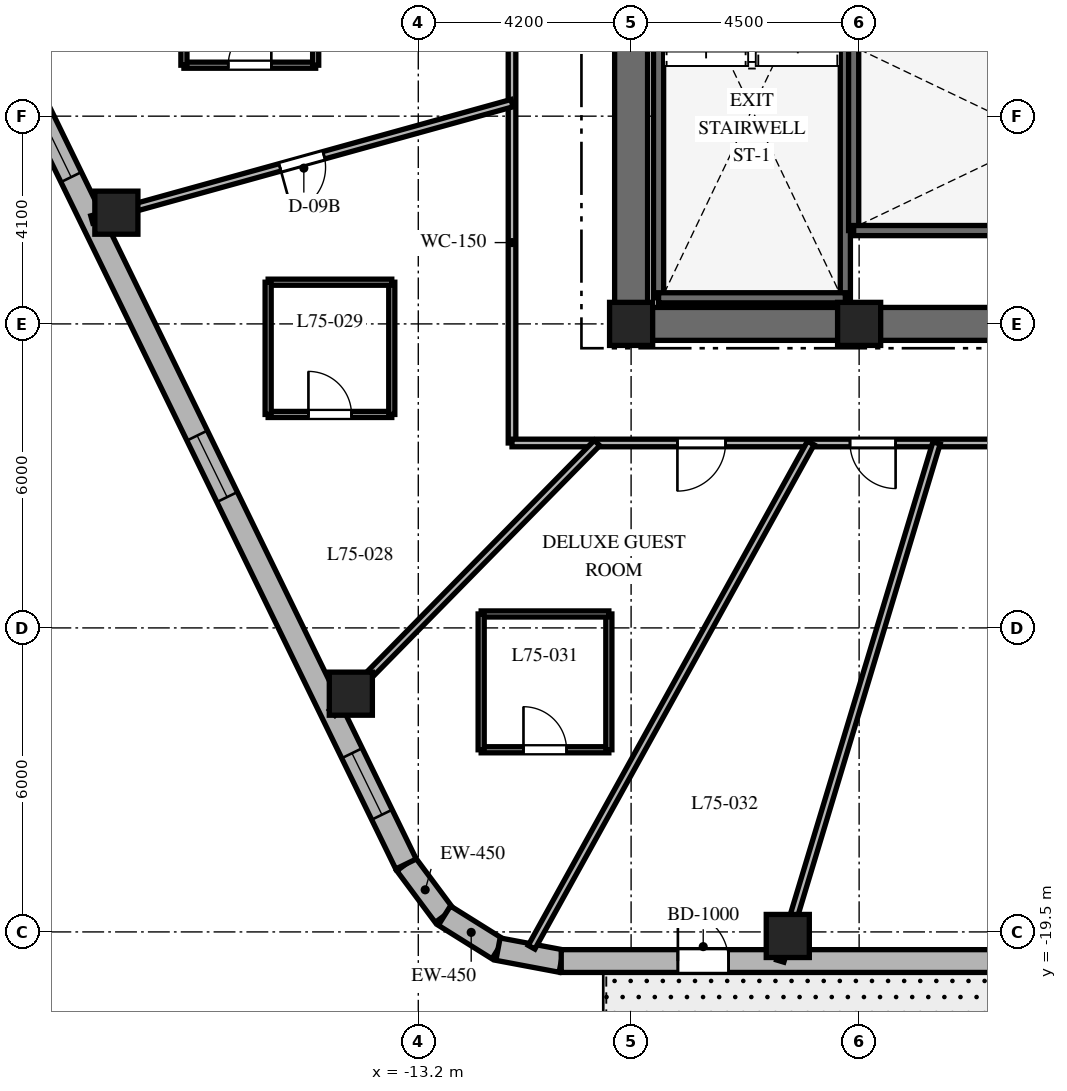
"""IFC4 building model, lengths in metres.
Left out: names, types, materials, properties, quantities, classifications, styles, units other than length and angle.
Written with IfcOpenShell. Run it as: python <this file> out.ifc"""

import sys

from ifc_helpers import new_model, si_unit, direction, frame, frame_2d, origin, origin_2d, place, context, subcontext, project, spatial, rectangle, extrude, element, fill, save


model = new_model("IFC4")
c1 = context("Model", 3, precision=1e-05, world=origin(), true_north=direction((0.0, 1.0)))
c2 = subcontext(c1, "Body", "Model", "MODEL_VIEW")
j1 = project(units=[si_unit("LENGTHUNIT", "METRE"), si_unit("PLANEANGLEUNIT", "RADIAN")], contexts=[c1])
p1 = place(None, origin())
s1 = spatial("IfcSite", under=j1, at=p1, CompositionType="ELEMENT")
p2 = place(p1, origin())
s2 = spatial("IfcBuilding", under=s1, at=p2, CompositionType="ELEMENT")
p3 = place(p2, frame((0.0, 0.0, 301.5)))
s3 = spatial("IfcBuildingStorey", under=s2, at=p3, CompositionType="ELEMENT", Elevation=301.5)
p4 = place(p3, frame((-9.325, -7.5, 0.0), z_axis=(0.0, 0.0, 1.0), x_axis=(1.0, 0.0, 0.0)))
e1 = element("IfcWall", 1, at=p4, inside=s3, PredefinedType="SHEAR", context=c2, shape_type="SweptSolid", body=[
    extrude(rectangle(XDim=18.65, YDim=0.65, at=frame_2d((9.325, 0.0))), origin(), (0.0, 0.0, 1.0), 3.9),
])
p5 = place(p4, frame((9.375, 0.0, 0.0)))
e2 = element("IfcOpeningElement", 2, at=p5, cuts=e1, PredefinedType="OPENING", context=c2, shape_type="SweptSolid", body=[
    extrude(rectangle(XDim=1.0, YDim=2.15, at=frame_2d((0.5, 1.075))), frame((0.0, 0.335, 0.0), z_axis=(0.0, -1.0, 0.0), x_axis=(1.0, 0.0, 0.0)), (0.0, 0.0, 1.0), 0.67),
])
p6 = place(p3, frame((-9.0, -7.175, 0.0), z_axis=(0.0, 0.0, 1.0), x_axis=(0.0, 1.0, 0.0)))
e3 = element("IfcWall", 3, at=p6, inside=s3, PredefinedType="SHEAR", context=c2, shape_type="SweptSolid", body=[
    extrude(rectangle(XDim=14.35, YDim=0.65, at=frame_2d((7.175, 0.0))), origin(), (0.0, 0.0, 1.0), 3.9),
])
p7 = place(p6, frame((10.3, 0.0, 0.0)))
e4 = element("IfcOpeningElement", 4, at=p7, cuts=e3, PredefinedType="OPENING", context=c2, shape_type="SweptSolid", body=[
    extrude(rectangle(XDim=1.05, YDim=2.15, at=frame_2d((0.525, 1.075))), frame((0.0, 0.335, 0.0), z_axis=(0.0, -1.0, 0.0), x_axis=(1.0, 0.0, 0.0)), (0.0, 0.0, 1.0), 0.67),
])
for number, where, z_axis, x_axis in (
    (5, (-8.458, -6.985, 0.0), (0.0, 0.0, 1.0), (0.0, 1.0, 0.0)),
    (6, (-4.772, -6.985, 0.0), (0.0, 0.0, 1.0), (0.0, 1.0, 0.0)),
):
    element("IfcWall", number, at=place(p3, frame(where, z_axis=z_axis, x_axis=x_axis)), inside=s3, PredefinedType="SHEAR", context=c2, shape_type="SweptSolid", body=[
        extrude(rectangle(XDim=9.143, YDim=0.2, at=frame_2d((4.572, 0.0))), origin(), (0.0, 0.0, 1.0), 3.9),
    ])
for number, where, z_axis, x_axis in (
    (7, (-8.458, -6.985, 0.0), (0.0, 0.0, 1.0), (1.0, 0.0, 0.0)),
    (8, (-4.608, -5.658, 0.0), (0.0, 0.0, 1.0), (0.0, 1.0, 0.0)),
):
    element("IfcWall", number, at=place(p3, frame(where, z_axis=z_axis, x_axis=x_axis)), inside=s3, PredefinedType="SHEAR", context=c2, shape_type="SweptSolid", body=[
        extrude(rectangle(XDim=3.686, YDim=0.2, at=frame_2d((1.843, 0.0))), origin(), (0.0, 0.0, 1.0), 3.9),
    ])
p8 = place(p3, frame((-4.608, -5.658, 0.0), z_axis=(0.0, 0.0, 1.0), x_axis=(1.0, 0.0, 0.0)))
e9 = element("IfcWall", 9, at=p8, inside=s3, PredefinedType="SHEAR", context=c2, shape_type="SweptSolid", body=[
    extrude(rectangle(XDim=9.166, YDim=0.2, at=frame_2d((4.583, 0.0))), origin(), (0.0, 0.0, 1.0), 3.9),
])
p9 = place(p8, frame((7.45, 0.0, 0.0)))
e10 = element("IfcOpeningElement", 10, at=p9, cuts=e9, PredefinedType="OPENING", context=c2, shape_type="SweptSolid", body=[
    extrude(rectangle(XDim=1.0, YDim=2.15, at=frame_2d((0.5, 1.075))), frame((0.0, 0.11, 0.0), z_axis=(0.0, -1.0, 0.0), x_axis=(1.0, 0.0, 0.0)), (0.0, 0.0, 1.0), 0.22),
])
for number, where, z_axis, x_axis in (
    (11, (-9.0, -7.5, 0.0), (0.0, 0.0, 1.0), (1.0, 0.0, 0.0)),
    (12, (-4.5, -7.5, 0.0), (0.0, 0.0, 1.0), (1.0, 0.0, 0.0)),
    (13, (-5.908, -19.58, 0.0), (0.0, 0.0, 1.0), (1.0, 0.0, 0.0)),
    (14, (-19.158, -5.305, 0.0), (0.0, 0.0, 1.0), (1.0, 0.0, 0.0)),
    (15, (-14.531, -14.798, 0.0), (0.0, 0.0, 1.0), (1.0, 0.0, 0.0)),
):
    element("IfcColumn", number, at=place(p3, frame(where, z_axis=z_axis, x_axis=x_axis)), inside=s3, PredefinedType="COLUMN", context=c2, shape_type="SweptSolid", body=[
        extrude(rectangle(XDim=0.85, YDim=0.85, at=origin_2d()), origin(), (0.0, 0.0, 1.0), 3.9),
    ])
p10 = place(p3, frame((-13.443, -18.16, 0.0), z_axis=(0.0, 0.0, 1.0), x_axis=(0.597042425808, -0.802209661987, 0.0)))
e16 = element("IfcWall", 16, at=p10, inside=s3, PredefinedType="SOLIDWALL", context=c2, shape_type="SweptSolid", body=[
    extrude(rectangle(XDim=1.27, YDim=0.45, at=frame_2d((0.635, 0.0))), origin(), (0.0, 0.0, 1.0), 3.58),
])
p11 = place(p3, frame((-12.685, -19.178, 0.0), z_axis=(0.0, 0.0, 1.0), x_axis=(0.848031272749, -0.529946186362, 0.0)))
e17 = element("IfcWall", 17, at=p11, inside=s3, PredefinedType="SOLIDWALL", context=c2, shape_type="SweptSolid", body=[
    extrude(rectangle(XDim=1.248, YDim=0.45, at=frame_2d((0.624, 0.0))), origin(), (0.0, 0.0, 1.0), 3.58),
])
p12 = place(p3, frame((-11.626, -19.84, 0.0), z_axis=(0.0, 0.0, 1.0), x_axis=(0.982701956681, -0.185194126083, 0.0)))
e18 = element("IfcWall", 18, at=p12, inside=s3, PredefinedType="SOLIDWALL", context=c2, shape_type="SweptSolid", body=[
    extrude(rectangle(XDim=1.27, YDim=0.45, at=frame_2d((0.635, 0.0))), origin(), (0.0, 0.0, 1.0), 3.58),
])
p13 = place(p3, frame((-10.379, -20.075, 0.0), z_axis=(0.0, 0.0, 1.0), x_axis=(1.0, 0.0, 0.0)))
e19 = element("IfcWall", 19, at=p13, inside=s3, PredefinedType="SOLIDWALL", context=c2, shape_type="SweptSolid", body=[
    extrude(rectangle(XDim=22.417, YDim=0.45, at=frame_2d((11.208, 0.0))), origin(), (0.0, 0.0, 1.0), 3.58),
])
p14 = place(p13, frame((2.302, 0.0, 0.0)))
e20 = element("IfcOpeningElement", 20, at=p14, cuts=e19, PredefinedType="OPENING", context=c2, shape_type="SweptSolid", body=[
    extrude(rectangle(XDim=1.0, YDim=2.15, at=frame_2d((0.5, 1.075))), frame((0.0, 0.235, 0.0), z_axis=(0.0, -1.0, 0.0), x_axis=(1.0, 0.0, 0.0)), (0.0, 0.0, 1.0), 0.47),
])
p15 = place(p13, frame((10.534, 0.0, 0.8)))
e21 = element("IfcOpeningElement", 21, at=p15, cuts=e19, PredefinedType="OPENING", context=c2, shape_type="SweptSolid", body=[
    extrude(rectangle(XDim=1.35, YDim=1.75, at=frame_2d((0.675, 0.875))), frame((0.0, 0.235, 0.0), z_axis=(0.0, -1.0, 0.0), x_axis=(1.0, 0.0, 0.0)), (0.0, 0.0, 1.0), 0.47),
])
p16 = place(p13, frame((19.587, 0.0, 0.8)))
e22 = element("IfcOpeningElement", 22, at=p16, cuts=e19, PredefinedType="OPENING", context=c2, shape_type="SweptSolid", body=[
    extrude(rectangle(XDim=1.35, YDim=1.75, at=frame_2d((0.675, 0.875))), frame((0.0, 0.235, 0.0), z_axis=(0.0, -1.0, 0.0), x_axis=(1.0, 0.0, 0.0)), (0.0, 0.0, 1.0), 0.47),
])
p17 = place(p3, frame((-21.138, -2.371, 0.0), z_axis=(0.0, 0.0, 1.0), x_axis=(0.438128124058, -0.89891253574, 0.0)))
e23 = element("IfcWall", 23, at=p17, inside=s3, PredefinedType="SOLIDWALL", context=c2, shape_type="SweptSolid", body=[
    extrude(rectangle(XDim=17.565, YDim=0.45, at=frame_2d((8.782, 0.0))), origin(), (0.0, 0.0, 1.0), 3.58),
])
p18 = place(p17, frame((1.133, 0.0, 0.8)))
e24 = element("IfcOpeningElement", 24, at=p18, cuts=e23, PredefinedType="OPENING", context=c2, shape_type="SweptSolid", body=[
    extrude(rectangle(XDim=1.35, YDim=1.75, at=frame_2d((0.675, 0.875))), frame((0.0, 0.235, 0.0), z_axis=(0.0, -1.0, 0.0), x_axis=(1.0, 0.0, 0.0)), (0.0, 0.0, 1.0), 0.47),
])
p19 = place(p17, frame((8.158, 0.0, 0.8)))
e25 = element("IfcOpeningElement", 25, at=p19, cuts=e23, PredefinedType="OPENING", context=c2, shape_type="SweptSolid", body=[
    extrude(rectangle(XDim=1.35, YDim=1.75, at=frame_2d((0.675, 0.875))), frame((0.0, 0.235, 0.0), z_axis=(0.0, -1.0, 0.0), x_axis=(1.0, 0.0, 0.0)), (0.0, 0.0, 1.0), 0.47),
])
p20 = place(p17, frame((15.132, 0.0, 0.8)))
e26 = element("IfcOpeningElement", 26, at=p20, cuts=e23, PredefinedType="OPENING", context=c2, shape_type="SweptSolid", body=[
    extrude(rectangle(XDim=1.35, YDim=1.75, at=frame_2d((0.675, 0.875))), frame((0.0, 0.235, 0.0), z_axis=(0.0, -1.0, 0.0), x_axis=(1.0, 0.0, 0.0)), (0.0, 0.0, 1.0), 0.47),
])
p21 = place(p3, frame((-11.35, -9.85, 0.0), z_axis=(0.0, 0.0, 1.0), x_axis=(0.0, 1.0, 0.0)))
e27 = element("IfcWall", 27, at=p21, inside=s3, PredefinedType="PARTITIONING", context=c2, shape_type="SweptSolid", body=[
    extrude(rectangle(XDim=12.4, YDim=0.15, at=frame_2d((6.2, 0.0))), origin(), (0.0, 0.0, 1.0), 2.17),
])
p22 = place(p21, frame((8.81, 0.0, 0.0)))
e28 = element("IfcOpeningElement", 28, at=p22, cuts=e27, PredefinedType="OPENING", context=c2, shape_type="SweptSolid", body=[
    extrude(rectangle(XDim=1.0, YDim=2.03, at=frame_2d((0.5, 1.015))), frame((0.0, 0.085, 0.0), z_axis=(0.0, -1.0, 0.0), x_axis=(1.0, 0.0, 0.0)), (0.0, 0.0, 1.0), 0.17),
])
p23 = place(p3, frame((-0.92, -9.85, 0.0), z_axis=(0.0, 0.0, 1.0), x_axis=(-1.0, 0.0, 0.0)))
e29 = element("IfcWall", 29, at=p23, inside=s3, PredefinedType="PARTITIONING", context=c2, shape_type="SweptSolid", body=[
    extrude(rectangle(XDim=10.43, YDim=0.15, at=frame_2d((5.215, 0.0))), origin(), (0.0, 0.0, 1.0), 2.17),
])
p24 = place(p23, frame((6.216, 0.0, 0.0)))
e30 = element("IfcOpeningElement", 30, at=p24, cuts=e29, PredefinedType="OPENING", context=c2, shape_type="SweptSolid", body=[
    extrude(rectangle(XDim=0.95, YDim=2.03, at=frame_2d((0.475, 1.015))), frame((0.0, 0.085, 0.0), z_axis=(0.0, -1.0, 0.0), x_axis=(1.0, 0.0, 0.0)), (0.0, 0.0, 1.0), 0.17),
])
p25 = place(p23, frame((2.86, 0.0, 0.0)))
e31 = element("IfcOpeningElement", 31, at=p25, cuts=e29, PredefinedType="OPENING", context=c2, shape_type="SweptSolid", body=[
    extrude(rectangle(XDim=0.9, YDim=2.03, at=frame_2d((0.45, 1.015))), frame((0.0, 0.085, 0.0), z_axis=(0.0, -1.0, 0.0), x_axis=(1.0, 0.0, 0.0)), (0.0, 0.0, 1.0), 0.17),
])
p26 = place(p3, frame((-11.35, -3.143, 0.0), z_axis=(0.0, 0.0, 1.0), x_axis=(-0.963731818141, -0.266872596386, 0.0)))
e32 = element("IfcWall", 32, at=p26, inside=s3, PredefinedType="PARTITIONING", context=c2, shape_type="SweptSolid", body=[
    extrude(rectangle(XDim=8.605, YDim=0.15, at=frame_2d((4.302, 0.0))), origin(), (0.0, 0.0, 1.0), 2.17),
])
p27 = place(p26, frame((3.852, 0.0, 0.0)))
e33 = element("IfcOpeningElement", 33, at=p27, cuts=e32, PredefinedType="OPENING", context=c2, shape_type="SweptSolid", body=[
    extrude(rectangle(XDim=0.9, YDim=2.03, at=frame_2d((0.45, 1.015))), frame((0.0, 0.085, 0.0), z_axis=(0.0, -1.0, 0.0), x_axis=(1.0, 0.0, 0.0)), (0.0, 0.0, 1.0), 0.17),
])
p28 = place(p3, frame((-9.672, -9.85, 0.0), z_axis=(0.0, 0.0, 1.0), x_axis=(-0.700629771301, -0.713524998558, 0.0)))
e34 = element("IfcWall", 34, at=p28, inside=s3, PredefinedType="PARTITIONING", context=c2, shape_type="SweptSolid", body=[
    extrude(rectangle(XDim=7.459, YDim=0.15, at=frame_2d((3.73, 0.0))), origin(), (0.0, 0.0, 1.0), 2.17),
])
p29 = place(p3, frame((-5.454, -9.85, 0.0), z_axis=(0.0, 0.0, 1.0), x_axis=(-0.48439420613, -0.874849846012, 0.0)))
e35 = element("IfcWall", 35, at=p29, inside=s3, PredefinedType="PARTITIONING", context=c2, shape_type="SweptSolid", body=[
    extrude(rectangle(XDim=11.375, YDim=0.15, at=frame_2d((5.688, 0.0))), origin(), (0.0, 0.0, 1.0), 2.17),
])
p30 = place(p3, frame((-2.972, -9.85, 0.0), z_axis=(0.0, 0.0, 1.0), x_axis=(-0.288872169679, -0.957367677324, 0.0)))
e36 = element("IfcWall", 36, at=p30, inside=s3, PredefinedType="PARTITIONING", context=c2, shape_type="SweptSolid", body=[
    extrude(rectangle(XDim=10.68, YDim=0.15, at=frame_2d((5.34, 0.0))), origin(), (0.0, 0.0, 1.0), 2.17),
])
p31 = place(p3, frame((-17.825, -2.394, 0.0), z_axis=(0.0, 0.0, 1.0), x_axis=(1.0, 0.0, 0.0)))
e37 = element("IfcWall", 37, at=p31, inside=s3, PredefinedType="PARTITIONING", context=c2, shape_type="SweptSolid", body=[
    extrude(rectangle(XDim=2.6, YDim=0.12, at=frame_2d((1.3, 0.0))), origin(), (0.0, 0.0, 1.0), 3.021),
])
p32 = place(p31, frame((0.875, 0.0, 0.0)))
e38 = element("IfcOpeningElement", 38, at=p32, cuts=e37, PredefinedType="OPENING", context=c2, shape_type="SweptSolid", body=[
    extrude(rectangle(XDim=0.85, YDim=2.03, at=frame_2d((0.425, 1.015))), frame((0.0, 0.07, 0.0), z_axis=(0.0, -1.0, 0.0), x_axis=(1.0, 0.0, 0.0)), (0.0, 0.0, 1.0), 0.14),
])
for number, where, z_axis, x_axis in (
    (39, (-15.225, -2.394, 0.0), (0.0, 0.0, 1.0), (0.0, 1.0, 0.0)),
    (40, (-17.825, 0.356, 0.0), (0.0, 0.0, 1.0), (0.0, -1.0, 0.0)),
):
    element("IfcWall", number, at=place(p3, frame(where, z_axis=z_axis, x_axis=x_axis)), inside=s3, PredefinedType="PARTITIONING", context=c2, shape_type="SweptSolid", body=[
        extrude(rectangle(XDim=2.75, YDim=0.12, at=frame_2d((1.375, 0.0))), origin(), (0.0, 0.0, 1.0), 3.58),
    ])
p33 = place(p3, frame((-16.163, -9.287, 0.0), z_axis=(0.0, 0.0, 1.0), x_axis=(1.0, 0.0, 0.0)))
e41 = element("IfcWall", 41, at=p33, inside=s3, PredefinedType="PARTITIONING", context=c2, shape_type="SweptSolid", body=[
    extrude(rectangle(XDim=2.44, YDim=0.12, at=frame_2d((1.22, 0.0))), origin(), (0.0, 0.0, 1.0), 3.106),
])
p34 = place(p33, frame((0.795, 0.0, 0.0)))
e42 = element("IfcOpeningElement", 42, at=p34, cuts=e41, PredefinedType="OPENING", context=c2, shape_type="SweptSolid", body=[
    extrude(rectangle(XDim=0.85, YDim=2.03, at=frame_2d((0.425, 1.015))), frame((0.0, 0.07, 0.0), z_axis=(0.0, -1.0, 0.0), x_axis=(1.0, 0.0, 0.0)), (0.0, 0.0, 1.0), 0.14),
])
p35 = place(p3, frame((-13.723, -9.287, 0.0), z_axis=(0.0, 0.0, 1.0), x_axis=(0.0, 1.0, 0.0)))
e43 = element("IfcWall", 43, at=p35, inside=s3, PredefinedType="PARTITIONING", context=c2, shape_type="SweptSolid", body=[
    extrude(rectangle(XDim=2.61, YDim=0.12, at=frame_2d((1.305, 0.0))), origin(), (0.0, 0.0, 1.0), 3.58),
])
p36 = place(p3, frame((-13.723, -6.677, 0.0), z_axis=(0.0, 0.0, 1.0), x_axis=(-1.0, 0.0, 0.0)))
e44 = element("IfcWall", 44, at=p36, inside=s3, PredefinedType="PARTITIONING", context=c2, shape_type="SweptSolid", body=[
    extrude(rectangle(XDim=2.44, YDim=0.12, at=frame_2d((1.22, 0.0))), origin(), (0.0, 0.0, 1.0), 3.106),
])
p37 = place(p3, frame((-16.163, -6.677, 0.0), z_axis=(0.0, 0.0, 1.0), x_axis=(0.0, -1.0, 0.0)))
e45 = element("IfcWall", 45, at=p37, inside=s3, PredefinedType="PARTITIONING", context=c2, shape_type="SweptSolid", body=[
    extrude(rectangle(XDim=2.61, YDim=0.12, at=frame_2d((1.305, 0.0))), origin(), (0.0, 0.0, 1.0), 3.58),
])
p38 = place(p3, frame((-11.959, -15.905, 0.0), z_axis=(0.0, 0.0, 1.0), x_axis=(1.0, 0.0, 0.0)))
e46 = element("IfcWall", 46, at=p38, inside=s3, PredefinedType="PARTITIONING", context=c2, shape_type="SweptSolid", body=[
    extrude(rectangle(XDim=2.52, YDim=0.12, at=frame_2d((1.26, 0.0))), origin(), (0.0, 0.0, 1.0), 2.17),
])
p39 = place(p38, frame((0.835, 0.0, 0.0)))
e47 = element("IfcOpeningElement", 47, at=p39, cuts=e46, PredefinedType="OPENING", context=c2, shape_type="SweptSolid", body=[
    extrude(rectangle(XDim=0.85, YDim=2.03, at=frame_2d((0.425, 1.015))), frame((0.0, 0.07, 0.0), z_axis=(0.0, -1.0, 0.0), x_axis=(1.0, 0.0, 0.0)), (0.0, 0.0, 1.0), 0.14),
])
p40 = place(p3, frame((-9.439, -15.905, 0.0), z_axis=(0.0, 0.0, 1.0), x_axis=(0.0, 1.0, 0.0)))
e48 = element("IfcWall", 48, at=p40, inside=s3, PredefinedType="PARTITIONING", context=c2, shape_type="SweptSolid", body=[
    extrude(rectangle(XDim=2.68, YDim=0.12, at=frame_2d((1.34, 0.0))), origin(), (0.0, 0.0, 1.0), 3.152),
])
p41 = place(p3, frame((-9.439, -13.225, 0.0), z_axis=(0.0, 0.0, 1.0), x_axis=(-1.0, 0.0, 0.0)))
e49 = element("IfcWall", 49, at=p41, inside=s3, PredefinedType="PARTITIONING", context=c2, shape_type="SweptSolid", body=[
    extrude(rectangle(XDim=2.52, YDim=0.12, at=frame_2d((1.26, 0.0))), origin(), (0.0, 0.0, 1.0), 3.152),
])
p42 = place(p3, frame((-11.959, -13.225, 0.0), z_axis=(0.0, 0.0, 1.0), x_axis=(0.0, -1.0, 0.0)))
e50 = element("IfcWall", 50, at=p42, inside=s3, PredefinedType="PARTITIONING", context=c2, shape_type="SweptSolid", body=[
    extrude(rectangle(XDim=2.68, YDim=0.12, at=frame_2d((1.34, 0.0))), origin(), (0.0, 0.0, 1.0), 2.17),
])
p43 = place(p14, origin())
e51 = element("IfcDoor", 51, at=p43, inside=s3, OperationType="SINGLE_SWING_LEFT", PredefinedType="DOOR", context=c2, shape_type="SweptSolid", body=[
    extrude(rectangle(XDim=1.0, YDim=2.15, at=frame_2d((0.5, 1.075))), frame((0.0, 0.025, 0.0), z_axis=(0.0, -1.0, 0.0), x_axis=(1.0, 0.0, 0.0)), (0.0, 0.0, 1.0), 0.05),
])
fill(e20, e51)
p44 = place(p18, origin())
e52 = element("IfcWindow", 52, at=p44, inside=s3, PartitioningType="SINGLE_PANEL", PredefinedType="WINDOW", context=c2, shape_type="SweptSolid", body=[
    extrude(rectangle(XDim=1.35, YDim=1.75, at=frame_2d((0.675, 0.875))), frame((0.0, 0.03, 0.0), z_axis=(0.0, -1.0, 0.0), x_axis=(1.0, 0.0, 0.0)), (0.0, 0.0, 1.0), 0.06),
])
fill(e24, e52)
p45 = place(p19, origin())
e53 = element("IfcWindow", 53, at=p45, inside=s3, PartitioningType="SINGLE_PANEL", PredefinedType="WINDOW", context=c2, shape_type="SweptSolid", body=[
    extrude(rectangle(XDim=1.35, YDim=1.75, at=frame_2d((0.675, 0.875))), frame((0.0, 0.03, 0.0), z_axis=(0.0, -1.0, 0.0), x_axis=(1.0, 0.0, 0.0)), (0.0, 0.0, 1.0), 0.06),
])
fill(e25, e53)
p46 = place(p20, origin())
e54 = element("IfcWindow", 54, at=p46, inside=s3, PartitioningType="SINGLE_PANEL", PredefinedType="WINDOW", context=c2, shape_type="SweptSolid", body=[
    extrude(rectangle(XDim=1.35, YDim=1.75, at=frame_2d((0.675, 0.875))), frame((0.0, 0.03, 0.0), z_axis=(0.0, -1.0, 0.0), x_axis=(1.0, 0.0, 0.0)), (0.0, 0.0, 1.0), 0.06),
])
fill(e26, e54)
p47 = place(p27, origin())
e55 = element("IfcDoor", 55, at=p47, inside=s3, OperationType="SINGLE_SWING_RIGHT", PredefinedType="DOOR", context=c2, shape_type="SweptSolid", body=[
    extrude(rectangle(XDim=0.9, YDim=2.03, at=frame_2d((0.45, 1.015))), frame((0.0, 0.025, 0.0), z_axis=(0.0, -1.0, 0.0), x_axis=(1.0, 0.0, 0.0)), (0.0, 0.0, 1.0), 0.05),
])
fill(e33, e55)
p48 = place(p32, origin())
e56 = element("IfcDoor", 56, at=p48, inside=s3, OperationType="SINGLE_SWING_RIGHT", PredefinedType="DOOR", context=c2, shape_type="SweptSolid", body=[
    extrude(rectangle(XDim=0.85, YDim=2.03, at=frame_2d((0.425, 1.015))), frame((0.0, 0.025, 0.0), z_axis=(0.0, -1.0, 0.0), x_axis=(1.0, 0.0, 0.0)), (0.0, 0.0, 1.0), 0.05),
])
fill(e38, e56)
p49 = place(p34, origin())
e57 = element("IfcDoor", 57, at=p49, inside=s3, OperationType="SINGLE_SWING_LEFT", PredefinedType="DOOR", context=c2, shape_type="SweptSolid", body=[
    extrude(rectangle(XDim=0.85, YDim=2.03, at=frame_2d((0.425, 1.015))), frame((0.0, 0.025, 0.0), z_axis=(0.0, -1.0, 0.0), x_axis=(1.0, 0.0, 0.0)), (0.0, 0.0, 1.0), 0.05),
])
fill(e42, e57)
p50 = place(p24, origin())
e58 = element("IfcDoor", 58, at=p50, inside=s3, OperationType="SINGLE_SWING_RIGHT", PredefinedType="DOOR", context=c2, shape_type="SweptSolid", body=[
    extrude(rectangle(XDim=0.95, YDim=2.03, at=frame_2d((0.475, 1.015))), frame((0.0, 0.025, 0.0), z_axis=(0.0, -1.0, 0.0), x_axis=(1.0, 0.0, 0.0)), (0.0, 0.0, 1.0), 0.05),
])
fill(e30, e58)
p51 = place(p39, origin())
e59 = element("IfcDoor", 59, at=p51, inside=s3, OperationType="SINGLE_SWING_LEFT", PredefinedType="DOOR", context=c2, shape_type="SweptSolid", body=[
    extrude(rectangle(XDim=0.85, YDim=2.03, at=frame_2d((0.425, 1.015))), frame((0.0, 0.025, 0.0), z_axis=(0.0, -1.0, 0.0), x_axis=(1.0, 0.0, 0.0)), (0.0, 0.0, 1.0), 0.05),
])
fill(e47, e59)
p52 = place(p25, origin())
e60 = element("IfcDoor", 60, at=p52, inside=s3, OperationType="SINGLE_SWING_LEFT", PredefinedType="DOOR", context=c2, shape_type="SweptSolid", body=[
    extrude(rectangle(XDim=0.9, YDim=2.03, at=frame_2d((0.45, 1.015))), frame((0.0, 0.025, 0.0), z_axis=(0.0, -1.0, 0.0), x_axis=(1.0, 0.0, 0.0)), (0.0, 0.0, 1.0), 0.05),
])
fill(e31, e60)
save(model, sys.argv[1])
